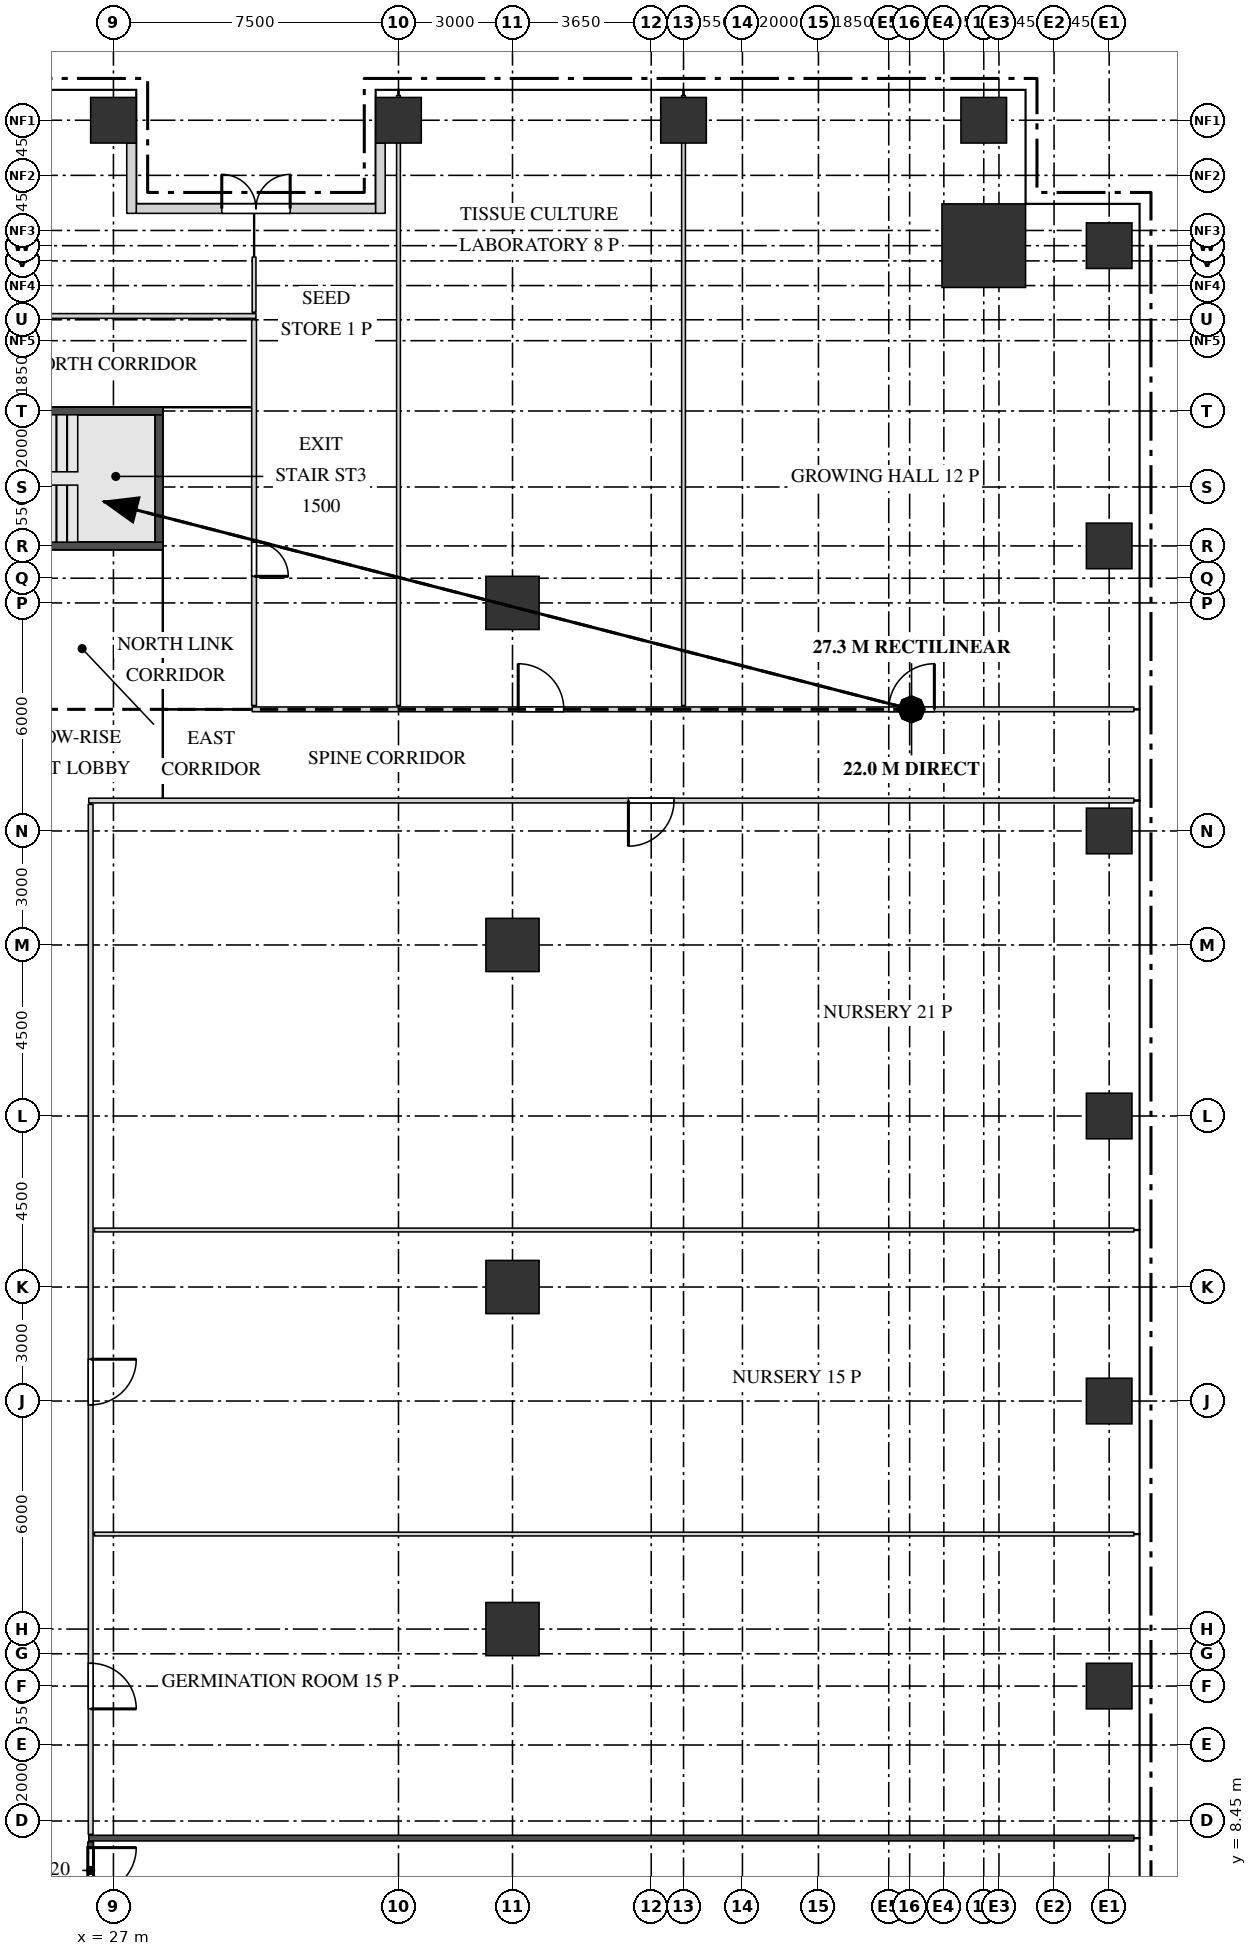
"""IFC4 building model, lengths in metres.
Left out: names, types, materials, properties, quantities, classifications, styles, units other than length and angle.
Written with IfcOpenShell. Run it as: python <this file> out.ifc"""

import sys

from ifc_helpers import new_model, si_unit, direction, frame, frame_2d, origin, origin_2d, place, context, subcontext, project, spatial, rectangle, extrude, source, transform, mapped, element, fill, save


model = new_model("IFC4")
c1 = context("Model", 3, precision=1e-05, world=origin(), true_north=direction((0.0, 1.0)))
c2 = subcontext(c1, "Body", "Model", "MODEL_VIEW")
j1 = project(units=[si_unit("LENGTHUNIT", "METRE"), si_unit("PLANEANGLEUNIT", "RADIAN")], contexts=[c1])
p1 = place(None, origin())
s1 = spatial("IfcSite", under=j1, at=p1, CompositionType="ELEMENT")
p2 = place(p1, origin())
s2 = spatial("IfcBuilding", under=s1, at=p2, CompositionType="ELEMENT")
p3 = place(p2, frame((0.0, 0.0, 46.5)))
s3 = spatial("IfcBuildingStorey", under=s2, at=p3, CompositionType="ELEMENT", Elevation=46.5)
m1 = source(origin(), c2, "Body", "SweptSolid", [
    extrude(rectangle(XDim=7.1, YDim=0.2, at=frame_2d((3.55, 0.0))), origin(), (0.0, 0.0, 1.0), 4.2),
])
p4 = place(p3, frame((21.2, 45.55, 0.0), z_axis=(0.0, 0.0, 1.0), x_axis=(1.0, 0.0, 0.0)))
e1 = element("IfcWall", 1, at=p4, inside=s3, PredefinedType="SHEAR", context=c2, shape_type="MappedRepresentation", body=[
    mapped(m1, transform((0.0, 0.0, 0.0))),
])
m2 = source(origin(), c2, "Body", "SweptSolid", [
    extrude(rectangle(XDim=1.2, YDim=2.1, at=frame_2d((0.6, 1.05))), frame((0.0, 0.11, 0.0), z_axis=(0.0, -1.0, 0.0), x_axis=(1.0, 0.0, 0.0)), (0.0, 0.0, 1.0), 0.22),
])
p5 = place(p4, frame((0.15, 0.0, 0.0)))
e2 = element("IfcOpeningElement", 2, at=p5, cuts=e1, PredefinedType="OPENING", context=c2, shape_type="MappedRepresentation", body=[
    mapped(m2, transform((0.0, 0.0, 0.0))),
])
p6 = place(p3, frame((21.2, 42.0, 0.0), z_axis=(0.0, 0.0, 1.0), x_axis=(1.0, 0.0, 0.0)))
e3 = element("IfcWall", 3, at=p6, inside=s3, PredefinedType="SHEAR", context=c2, shape_type="MappedRepresentation", body=[
    mapped(m1, transform((0.0, 0.0, 0.0))),
])
m3 = source(origin(), c2, "Body", "SweptSolid", [
    extrude(rectangle(XDim=3.35, YDim=0.2, at=frame_2d((1.675, 0.0))), origin(), (0.0, 0.0, 1.0), 4.2),
])
p7 = place(p3, frame((28.2, 42.1, 0.0), z_axis=(0.0, 0.0, 1.0), x_axis=(0.0, 1.0, 0.0)))
e4 = element("IfcWall", 4, at=p7, inside=s3, PredefinedType="SHEAR", context=c2, shape_type="MappedRepresentation", body=[
    mapped(m3, transform((0.0, 0.0, 0.0))),
])
m4 = source(origin(), c2, "Body", "SweptSolid", [
    extrude(rectangle(XDim=2.2, YDim=2.2, at=origin_2d()), origin(), (0.0, 0.0, 1.0), 4.5),
])
p8 = place(p3, frame((49.9, 49.9, 0.0), z_axis=(0.0, 0.0, 1.0), x_axis=(1.0, 0.0, 0.0)))
e5 = element("IfcColumn", 5, at=p8, inside=s3, PredefinedType="COLUMN", context=c2, shape_type="MappedRepresentation", body=[
    mapped(m4, transform((0.0, 0.0, 0.0))),
])
m5 = source(origin(), c2, "Body", "SweptSolid", [
    extrude(rectangle(XDim=1.2, YDim=1.2, at=origin_2d()), origin(), (0.0, 0.0, 1.0), 4.2),
])
for number, where, z_axis, x_axis in (
    (6, (53.2, 12.0, 0.0), (0.0, 0.0, 1.0), (1.0, 0.0, 0.0)),
    (7, (53.2, 19.5, 0.0), (0.0, 0.0, 1.0), (1.0, 0.0, 0.0)),
    (8, (53.2, 27.0, 0.0), (0.0, 0.0, 1.0), (1.0, 0.0, 0.0)),
    (9, (53.2, 34.5, 0.0), (0.0, 0.0, 1.0), (1.0, 0.0, 0.0)),
    (10, (53.2, 42.0, 0.0), (0.0, 0.0, 1.0), (1.0, 0.0, 0.0)),
    (11, (53.2, 49.9, 0.0), (0.0, 0.0, 1.0), (1.0, 0.0, 0.0)),
    (12, (27.0, 53.2, 0.0), (0.0, 0.0, 1.0), (1.0, 0.0, 0.0)),
    (13, (34.5, 53.2, 0.0), (0.0, 0.0, 1.0), (1.0, 0.0, 0.0)),
    (14, (42.0, 53.2, 0.0), (0.0, 0.0, 1.0), (1.0, 0.0, 0.0)),
    (15, (49.9, 53.2, 0.0), (0.0, 0.0, 1.0), (1.0, 0.0, 0.0)),
):
    element("IfcColumn", number, at=place(p3, frame(where, z_axis=z_axis, x_axis=x_axis)), inside=s3, PredefinedType="COLUMN", context=c2, shape_type="MappedRepresentation", body=[
        mapped(m5, transform((0.0, 0.0, 0.0))),
    ])
m6 = source(origin(), c2, "Body", "SweptSolid", [
    extrude(rectangle(XDim=1.4, YDim=1.4, at=origin_2d()), origin(), (0.0, 0.0, 1.0), 4.2),
])
for number, where, z_axis, x_axis in (
    (16, (37.5, 13.5, 0.0), (0.0, 0.0, 1.0), (1.0, 0.0, 0.0)),
    (17, (37.5, 22.5, 0.0), (0.0, 0.0, 1.0), (1.0, 0.0, 0.0)),
    (18, (37.5, 31.5, 0.0), (0.0, 0.0, 1.0), (1.0, 0.0, 0.0)),
    (19, (37.5, 40.5, 0.0), (0.0, 0.0, 1.0), (1.0, 0.0, 0.0)),
):
    element("IfcColumn", number, at=place(p3, frame(where, z_axis=z_axis, x_axis=x_axis)), inside=s3, PredefinedType="COLUMN", context=c2, shape_type="MappedRepresentation", body=[
        mapped(m6, transform((0.0, 0.0, 0.0))),
    ])
m7 = source(origin(), c2, "Body", "SweptSolid", [
    extrude(rectangle(XDim=6.3, YDim=0.25, at=frame_2d((3.15, 0.0))), origin(), (0.0, 0.0, 1.0), 4.2),
])
p9 = place(p3, frame((27.6, 50.875, 0.0), z_axis=(0.0, 0.0, 1.0), x_axis=(1.0, 0.0, 0.0)))
e20 = element("IfcWall", 20, at=p9, inside=s3, PredefinedType="SOLIDWALL", context=c2, shape_type="MappedRepresentation", body=[
    mapped(m7, transform((0.0, 0.0, 0.0))),
])
m8 = source(origin(), c2, "Body", "SweptSolid", [
    extrude(rectangle(XDim=1.6, YDim=2.4, at=frame_2d((0.8, 1.2))), frame((0.0, 0.135, 0.0), z_axis=(0.0, -1.0, 0.0), x_axis=(1.0, 0.0, 0.0)), (0.0, 0.0, 1.0), 0.27),
])
p10 = place(p9, frame((0.35, 0.0, 0.0)))
e21 = element("IfcOpeningElement", 21, at=p10, cuts=e20, PredefinedType="OPENING", context=c2, shape_type="MappedRepresentation", body=[
    mapped(m8, transform((0.0, 0.0, 0.0))),
])
p11 = place(p9, frame((4.35, 0.0, 0.0)))
e22 = element("IfcOpeningElement", 22, at=p11, cuts=e20, PredefinedType="OPENING", context=c2, shape_type="MappedRepresentation", body=[
    mapped(m8, transform((0.0, 0.0, 0.0))),
])
m9 = source(origin(), c2, "Body", "SweptSolid", [
    extrude(rectangle(XDim=1.8, YDim=2.4, at=frame_2d((0.9, 1.2))), frame((0.0, 0.135, 0.0), z_axis=(0.0, -1.0, 0.0), x_axis=(1.0, 0.0, 0.0)), (0.0, 0.0, 1.0), 0.27),
])
p12 = place(p9, frame((2.25, 0.0, 0.0)))
e23 = element("IfcOpeningElement", 23, at=p12, cuts=e20, PredefinedType="OPENING", context=c2, shape_type="MappedRepresentation", body=[
    mapped(m9, transform((0.0, 0.0, 0.0))),
])
m10 = source(origin(), c2, "Body", "SweptSolid", [
    extrude(rectangle(XDim=1.85, YDim=0.25, at=frame_2d((0.925, 0.0))), origin(), (0.0, 0.0, 1.0), 3.9),
])
for number, where, z_axis, x_axis in (
    (24, (27.475, 52.6, 0.0), (0.0, 0.0, 1.0), (0.0, -1.0, 0.0)),
    (25, (34.025, 52.6, 0.0), (0.0, 0.0, 1.0), (0.0, -1.0, 0.0)),
):
    element("IfcWall", number, at=place(p3, frame(where, z_axis=z_axis, x_axis=x_axis)), inside=s3, PredefinedType="SOLIDWALL", context=c2, shape_type="MappedRepresentation", body=[
        mapped(m10, transform((0.0, 0.0, 0.0))),
    ])
m11 = source(origin(), c2, "Body", "SweptSolid", [
    extrude(rectangle(XDim=7.75, YDim=0.15, at=frame_2d((3.875, 0.0))), origin(), (0.0, 0.0, 1.0), 4.3),
])
p13 = place(p3, frame((26.4, 0.15, 0.0), z_axis=(0.0, 0.0, 1.0), x_axis=(0.0, 1.0, 0.0)))
e26 = element("IfcWall", 26, at=p13, inside=s3, PredefinedType="PARTITIONING", context=c2, shape_type="MappedRepresentation", body=[
    mapped(m11, transform((0.0, 0.0, 0.0))),
])
m12 = source(origin(), c2, "Body", "SweptSolid", [
    extrude(rectangle(XDim=1.2, YDim=2.1, at=frame_2d((0.6, 1.05))), frame((0.0, 0.085, 0.0), z_axis=(0.0, -1.0, 0.0), x_axis=(1.0, 0.0, 0.0)), (0.0, 0.0, 1.0), 0.17),
])
p14 = place(p13, frame((6.4, 0.0, 0.0)))
e27 = element("IfcOpeningElement", 27, at=p14, cuts=e26, PredefinedType="OPENING", context=c2, shape_type="MappedRepresentation", body=[
    mapped(m12, transform((0.0, 0.0, 0.0))),
])
m13 = source(origin(), c2, "Body", "SweptSolid", [
    extrude(rectangle(XDim=27.5, YDim=0.15, at=frame_2d((13.75, 0.0))), origin(), (0.0, 0.0, 1.0), 4.3),
])
p15 = place(p3, frame((26.35, 8.0, 0.0), z_axis=(0.0, 0.0, 1.0), x_axis=(1.0, 0.0, 0.0)))
e28 = element("IfcWall", 28, at=p15, inside=s3, PredefinedType="PARTITIONING", context=c2, shape_type="MappedRepresentation", body=[
    mapped(m13, transform((0.0, 0.0, 0.0))),
])
m14 = source(origin(), c2, "Body", "SweptSolid", [
    extrude(rectangle(XDim=27.1, YDim=0.125, at=frame_2d((13.55, 0.0))), origin(), (0.0, 0.0, 1.0), 4.3),
])
p16 = place(p3, frame((26.4, 8.1, 0.0), z_axis=(0.0, 0.0, 1.0), x_axis=(0.0, 1.0, 0.0)))
e29 = element("IfcWall", 29, at=p16, inside=s3, PredefinedType="PARTITIONING", context=c2, shape_type="MappedRepresentation", body=[
    mapped(m14, transform((0.0, 0.0, 0.0))),
])
m15 = source(origin(), c2, "Body", "SweptSolid", [
    extrude(rectangle(XDim=1.2, YDim=2.1, at=frame_2d((0.6, 1.05))), frame((0.0, 0.073, 0.0), z_axis=(0.0, -1.0, 0.0), x_axis=(1.0, 0.0, 0.0)), (0.0, 0.0, 1.0), 0.145),
])
p17 = place(p16, frame((3.3, 0.0, 0.0)))
e30 = element("IfcOpeningElement", 30, at=p17, cuts=e29, PredefinedType="OPENING", context=c2, shape_type="MappedRepresentation", body=[
    mapped(m15, transform((0.0, 0.0, 0.0))),
])
p18 = place(p16, frame((11.3, 0.0, 0.0)))
e31 = element("IfcOpeningElement", 31, at=p18, cuts=e29, PredefinedType="OPENING", context=c2, shape_type="MappedRepresentation", body=[
    mapped(m15, transform((0.0, 0.0, 0.0))),
])
m16 = source(origin(), c2, "Body", "SweptSolid", [
    extrude(rectangle(XDim=27.35, YDim=0.1, at=frame_2d((13.675, 0.0))), origin(), (0.0, 0.0, 1.0), 4.3),
])
for number, where, z_axis, x_axis in (
    (32, (26.5, 16.0, 0.0), (0.0, 0.0, 1.0), (1.0, 0.0, 0.0)),
    (33, (26.5, 24.0, 0.0), (0.0, 0.0, 1.0), (1.0, 0.0, 0.0)),
):
    element("IfcWall", number, at=place(p3, frame(where, z_axis=z_axis, x_axis=x_axis)), inside=s3, PredefinedType="PARTITIONING", context=c2, shape_type="MappedRepresentation", body=[
        mapped(m16, transform((0.0, 0.0, 0.0))),
    ])
m17 = source(origin(), c2, "Body", "SweptSolid", [
    extrude(rectangle(XDim=27.5, YDim=0.125, at=frame_2d((13.75, 0.0))), origin(), (0.0, 0.0, 1.0), 4.3),
])
p19 = place(p3, frame((26.35, 35.3, 0.0), z_axis=(0.0, 0.0, 1.0), x_axis=(1.0, 0.0, 0.0)))
e34 = element("IfcWall", 34, at=p19, inside=s3, PredefinedType="PARTITIONING", context=c2, shape_type="MappedRepresentation", body=[
    mapped(m17, transform((0.0, 0.0, 0.0))),
])
p20 = place(p19, frame((14.2, 0.0, 0.0)))
e35 = element("IfcOpeningElement", 35, at=p20, cuts=e34, PredefinedType="OPENING", context=c2, shape_type="MappedRepresentation", body=[
    mapped(m15, transform((0.0, 0.0, 0.0))),
])
m18 = source(origin(), c2, "Body", "SweptSolid", [
    extrude(rectangle(XDim=23.2, YDim=0.125, at=frame_2d((11.6, 0.0))), origin(), (0.0, 0.0, 1.0), 4.3),
])
p21 = place(p3, frame((30.65, 37.7, 0.0), z_axis=(0.0, 0.0, 1.0), x_axis=(1.0, 0.0, 0.0)))
e36 = element("IfcWall", 36, at=p21, inside=s3, PredefinedType="PARTITIONING", context=c2, shape_type="MappedRepresentation", body=[
    mapped(m18, transform((0.0, 0.0, 0.0))),
])
p22 = place(p21, frame((7.0, 0.0, 0.0)))
e37 = element("IfcOpeningElement", 37, at=p22, cuts=e36, PredefinedType="OPENING", context=c2, shape_type="MappedRepresentation", body=[
    mapped(m15, transform((0.0, 0.0, 0.0))),
])
p23 = place(p21, frame((16.75, 0.0, 0.0)))
e38 = element("IfcOpeningElement", 38, at=p23, cuts=e36, PredefinedType="OPENING", context=c2, shape_type="MappedRepresentation", body=[
    mapped(m15, transform((0.0, 0.0, 0.0))),
])
m19 = source(origin(), c2, "Body", "SweptSolid", [
    extrude(rectangle(XDim=10.15, YDim=0.125, at=frame_2d((5.075, 0.0))), origin(), (0.0, 0.0, 1.0), 4.3),
])
p24 = place(p3, frame((30.7, 37.8, 0.0), z_axis=(0.0, 0.0, 1.0), x_axis=(0.0, 1.0, 0.0)))
e39 = element("IfcWall", 39, at=p24, inside=s3, PredefinedType="PARTITIONING", context=c2, shape_type="MappedRepresentation", body=[
    mapped(m19, transform((0.0, 0.0, 0.0))),
])
m20 = source(origin(), c2, "Body", "SweptSolid", [
    extrude(rectangle(XDim=0.9, YDim=2.1, at=frame_2d((0.45, 1.05))), frame((0.0, 0.073, 0.0), z_axis=(0.0, -1.0, 0.0), x_axis=(1.0, 0.0, 0.0)), (0.0, 0.0, 1.0), 0.145),
])
p25 = place(p24, frame((3.4, 0.0, 0.0)))
e40 = element("IfcOpeningElement", 40, at=p25, cuts=e39, PredefinedType="OPENING", context=c2, shape_type="MappedRepresentation", body=[
    mapped(m20, transform((0.0, 0.0, 0.0))),
])
m21 = source(origin(), c2, "Body", "SweptSolid", [
    extrude(rectangle(XDim=16.05, YDim=0.1, at=frame_2d((8.025, 0.0))), origin(), (0.0, 0.0, 1.0), 3.7),
])
for number, where, z_axis, x_axis in (
    (41, (34.5, 37.8, 0.0), (0.0, 0.0, 1.0), (0.0, 1.0, 0.0)),
    (42, (42.0, 37.8, 0.0), (0.0, 0.0, 1.0), (0.0, 1.0, 0.0)),
):
    element("IfcWall", number, at=place(p3, frame(where, z_axis=z_axis, x_axis=x_axis)), inside=s3, PredefinedType="PARTITIONING", context=c2, shape_type="MappedRepresentation", body=[
        mapped(m21, transform((0.0, 0.0, 0.0))),
    ])
m22 = source(origin(), c2, "Body", "SweptSolid", [
    extrude(rectangle(XDim=26.6, YDim=0.125, at=frame_2d((13.3, 0.0))), origin(), (0.0, 0.0, 1.0), 4.3),
])
p26 = place(p3, frame((4.15, 48.05, 0.0), z_axis=(0.0, 0.0, 1.0), x_axis=(1.0, 0.0, 0.0)))
e43 = element("IfcWall", 43, at=p26, inside=s3, PredefinedType="PARTITIONING", context=c2, shape_type="MappedRepresentation", body=[
    mapped(m22, transform((0.0, 0.0, 0.0))),
])
p27 = place(p26, frame((3.5, 0.0, 0.0)))
e44 = element("IfcOpeningElement", 44, at=p27, cuts=e43, PredefinedType="OPENING", context=c2, shape_type="MappedRepresentation", body=[
    mapped(m20, transform((0.0, 0.0, 0.0))),
])
p28 = place(p26, frame((16.6, 0.0, 0.0)))
e45 = element("IfcOpeningElement", 45, at=p28, cuts=e43, PredefinedType="OPENING", context=c2, shape_type="MappedRepresentation", body=[
    mapped(m15, transform((0.0, 0.0, 0.0))),
])
m23 = source(origin(), c2, "Body", "SweptSolid", [
    extrude(rectangle(XDim=1.45, YDim=0.1, at=frame_2d((0.725, 0.0))), origin(), (0.0, 0.0, 1.0), 4.3),
])
p29 = place(p3, frame((30.7, 48.15, 0.0), z_axis=(0.0, 0.0, 1.0), x_axis=(0.0, 1.0, 0.0)))
e46 = element("IfcWall", 46, at=p29, inside=s3, PredefinedType="PARTITIONING", context=c2, shape_type="MappedRepresentation", body=[
    mapped(m23, transform((0.0, 0.0, 0.0))),
])
m24 = source(origin(), c2, "Body", "SweptSolid", [
    extrude(rectangle(XDim=1.6, YDim=2.4, at=frame_2d((0.8, 1.2))), frame((0.0, 0.03, 0.0), z_axis=(0.0, -1.0, 0.0), x_axis=(1.0, 0.0, 0.0)), (0.0, 0.0, 1.0), 0.06),
])
p30 = place(p10, origin())
e47 = element("IfcWindow", 47, at=p30, inside=s3, PartitioningType="SINGLE_PANEL", PredefinedType="WINDOW", context=c2, shape_type="MappedRepresentation", body=[
    mapped(m24, transform((0.0, 0.0, 0.0))),
])
fill(e21, e47)
p31 = place(p11, origin())
e48 = element("IfcWindow", 48, at=p31, inside=s3, PartitioningType="SINGLE_PANEL", PredefinedType="WINDOW", context=c2, shape_type="MappedRepresentation", body=[
    mapped(m24, transform((0.0, 0.0, 0.0))),
])
fill(e22, e48)
m25 = source(origin(), c2, "Body", "SweptSolid", [
    extrude(rectangle(XDim=1.8, YDim=2.4, at=frame_2d((0.9, 1.2))), frame((0.0, 0.025, 0.0), z_axis=(0.0, -1.0, 0.0), x_axis=(1.0, 0.0, 0.0)), (0.0, 0.0, 1.0), 0.05),
])
p32 = place(p12, origin())
e49 = element("IfcDoor", 49, at=p32, inside=s3, OperationType="DOUBLE_DOOR_DOUBLE_SWING", PredefinedType="DOOR", context=c2, shape_type="MappedRepresentation", body=[
    mapped(m25, transform((0.0, 0.0, 0.0))),
])
fill(e23, e49)
m26 = source(origin(), c2, "Body", "SweptSolid", [
    extrude(rectangle(XDim=1.2, YDim=2.1, at=frame_2d((0.6, 1.05))), frame((0.0, 0.025, 0.0), z_axis=(0.0, -1.0, 0.0), x_axis=(1.0, 0.0, 0.0)), (0.0, 0.0, 1.0), 0.05),
])
p33 = place(p14, origin())
e50 = element("IfcDoor", 50, at=p33, inside=s3, OperationType="SINGLE_SWING_RIGHT", PredefinedType="DOOR", context=c2, shape_type="MappedRepresentation", body=[
    mapped(m26, transform((0.0, 0.0, 0.0))),
])
fill(e27, e50)
p34 = place(p17, origin())
e51 = element("IfcDoor", 51, at=p34, inside=s3, OperationType="SINGLE_SWING_LEFT", PredefinedType="DOOR", context=c2, shape_type="MappedRepresentation", body=[
    mapped(m26, transform((0.0, 0.0, 0.0))),
])
fill(e30, e51)
p35 = place(p18, origin())
e52 = element("IfcDoor", 52, at=p35, inside=s3, OperationType="SINGLE_SWING_RIGHT", PredefinedType="DOOR", context=c2, shape_type="MappedRepresentation", body=[
    mapped(m26, transform((0.0, 0.0, 0.0))),
])
fill(e31, e52)
p36 = place(p20, origin())
e53 = element("IfcDoor", 53, at=p36, inside=s3, OperationType="SINGLE_SWING_LEFT", PredefinedType="DOOR", context=c2, shape_type="MappedRepresentation", body=[
    mapped(m26, transform((0.0, 0.0, 0.0))),
])
fill(e35, e53)
m27 = source(origin(), c2, "Body", "SweptSolid", [
    extrude(rectangle(XDim=0.9, YDim=2.1, at=frame_2d((0.45, 1.05))), frame((0.0, 0.025, 0.0), z_axis=(0.0, -1.0, 0.0), x_axis=(1.0, 0.0, 0.0)), (0.0, 0.0, 1.0), 0.05),
])
p37 = place(p25, origin())
e54 = element("IfcDoor", 54, at=p37, inside=s3, OperationType="SINGLE_SWING_LEFT", PredefinedType="DOOR", context=c2, shape_type="MappedRepresentation", body=[
    mapped(m27, transform((0.0, 0.0, 0.0))),
])
fill(e40, e54)
p38 = place(p22, origin())
e55 = element("IfcDoor", 55, at=p38, inside=s3, OperationType="SINGLE_SWING_RIGHT", PredefinedType="DOOR", context=c2, shape_type="MappedRepresentation", body=[
    mapped(m26, transform((0.0, 0.0, 0.0))),
])
fill(e37, e55)
p39 = place(p23, origin())
e56 = element("IfcDoor", 56, at=p39, inside=s3, OperationType="SINGLE_SWING_LEFT", PredefinedType="DOOR", context=c2, shape_type="MappedRepresentation", body=[
    mapped(m26, transform((0.0, 0.0, 0.0))),
])
fill(e38, e56)
save(model, sys.argv[1])
